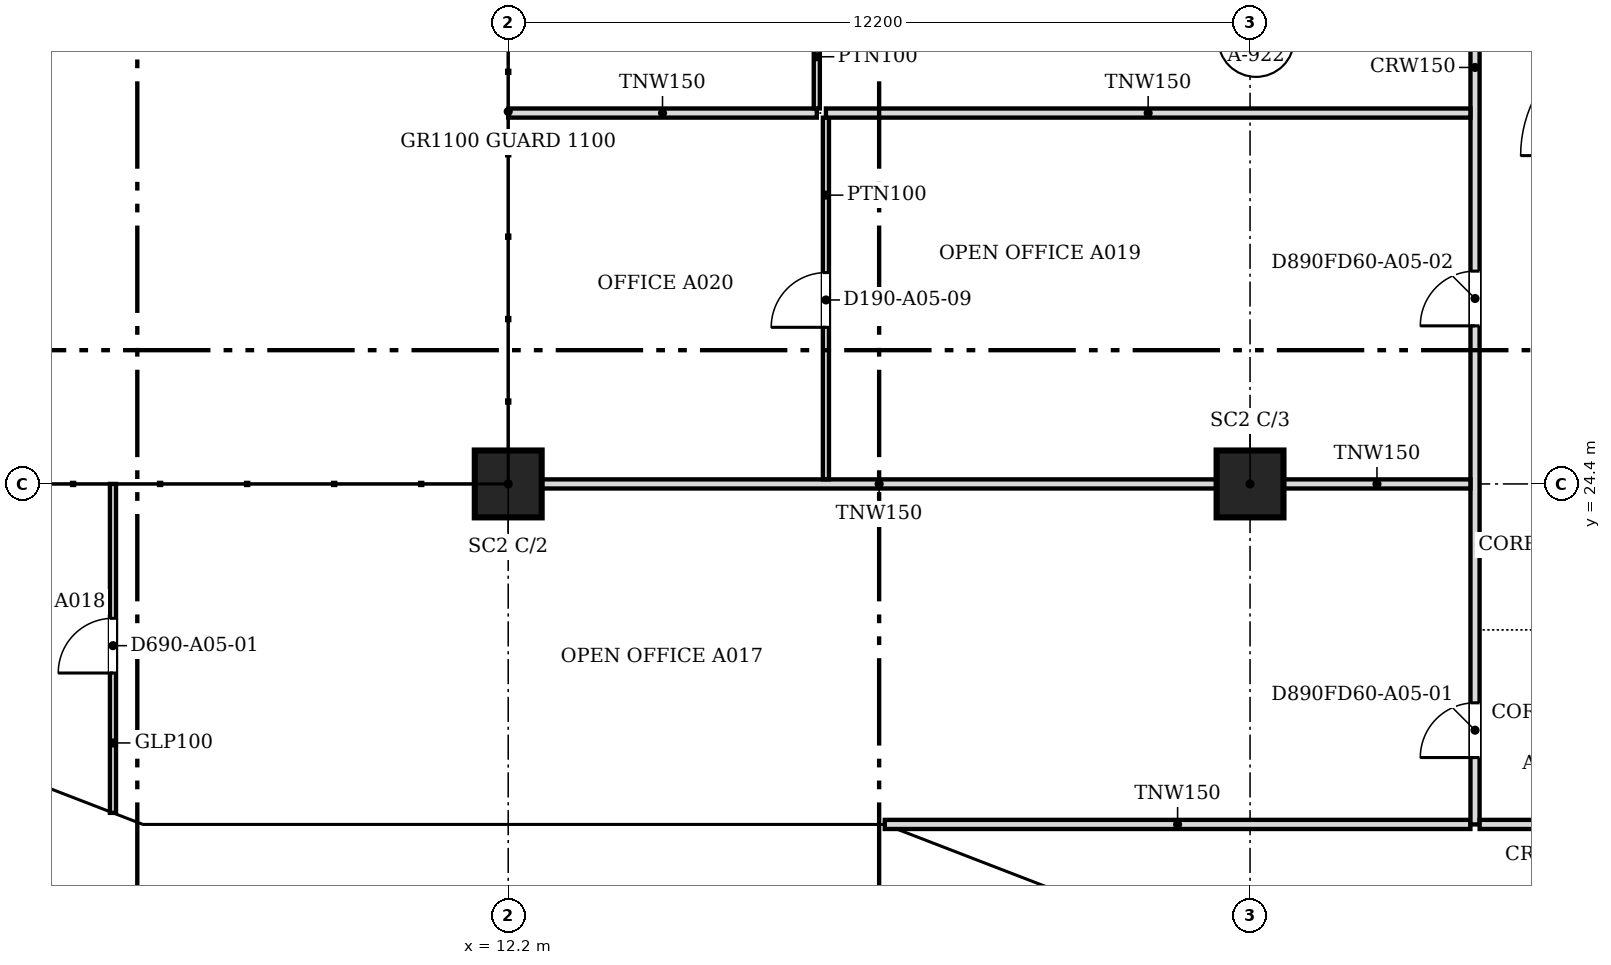
"""IFC4 building model, lengths in metres.
Left out: names, types, materials, properties, quantities, classifications, styles, units other than length and angle.
Written with IfcOpenShell. Run it as: python <this file> out.ifc"""

import sys

from ifc_helpers import new_model, si_unit, direction, frame, frame_2d, origin, origin_2d, place, context, subcontext, project, spatial, polyline, rectangle, outline, extrude, faceted_brep, source, transform, mapped, element, fill, save


model = new_model("IFC4")
c1 = context("Model", 3, precision=1e-05, world=origin(), true_north=direction((0.0, 1.0)))
c2 = subcontext(c1, "Body", "Model", "MODEL_VIEW")
j1 = project(units=[si_unit("LENGTHUNIT", "METRE"), si_unit("PLANEANGLEUNIT", "RADIAN")], contexts=[c1])
p1 = place(None, origin())
s1 = spatial("IfcSite", under=j1, at=p1, CompositionType="ELEMENT")
p2 = place(p1, origin())
s2 = spatial("IfcBuilding", under=s1, at=p2, CompositionType="ELEMENT")
p3 = place(p2, frame((0.0, 0.0, 56.2)))
s3 = spatial("IfcBuildingStorey", under=s2, at=p3, CompositionType="ELEMENT", Elevation=56.2)
for number, where, z_axis, x_axis in (
    (1, (12.2, 24.4, 0.0), (0.0, 0.0, 1.0), (1.0, 0.0, 0.0)),
    (2, (24.4, 24.4, 0.0), (0.0, 0.0, 1.0), (1.0, 0.0, 0.0)),
):
    element("IfcColumn", number, at=place(p3, frame(where, z_axis=z_axis, x_axis=x_axis)), inside=s3, PredefinedType="COLUMN", context=c2, shape_type="SweptSolid", body=[
        extrude(rectangle(XDim=1.1, YDim=1.1, at=origin_2d()), origin(), (0.0, 0.0, 1.0), 3.6),
    ])
m1 = source(origin(), c2, "Body", "Brep", [
    faceted_brep([(2.95, -0.25, 0.0), (2.997, -0.25, 0.059), (2.997, -0.25, 7.541), (2.95, -0.25, 7.6), (0.0, -0.25, 3.8), (0.053, 0.25, 3.868), (2.904, 0.25, 7.54), (2.904, 0.25, 0.06), (0.053, 0.25, 3.732), (2.95, 0.0, 0.0), (2.95, 0.0, 7.6), (0.0, 0.0, 3.8)], [[[0, 1, 2, 3, 4]], [[5, 6, 7, 8]], [[1, 0, 9]], [[10, 3, 2]], [[6, 5, 11, 4, 3, 10]], [[8, 7, 9, 0, 4, 11]], [[8, 11, 5]], [[1, 9, 7, 6, 10, 2]]]),
])
p4 = place(p3, frame((3.394, 19.612, -3.8), z_axis=(0.0, 0.0, 1.0), x_axis=(0.932990326376, -0.359901446078, 0.0)))
e3 = element("IfcWall", 3, at=p4, inside=s3, PredefinedType="SOLIDWALL", context=c2, shape_type="MappedRepresentation", body=[
    mapped(m1, transform((0.0, 0.0, 0.0), scale=1.0)),
])
m2 = source(origin(), c2, "Body", "SweptSolid", [
    extrude(outline(polyline([(2.75, 6.935), (0.316, 3.8), (2.75, 0.665), (2.75, 6.935)])), frame((0.0, 0.26, 0.0), z_axis=(0.0, -1.0, 0.0), x_axis=(1.0, 0.0, 0.0)), (0.0, 0.0, 1.0), 0.52),
])
p5 = place(p4, origin())
e4 = element("IfcOpeningElement", 4, at=p5, cuts=e3, PredefinedType="OPENING", context=c2, shape_type="MappedRepresentation", body=[
    mapped(m2, transform((0.0, 0.0, 0.0), scale=1.0)),
])
m3 = source(origin(), c2, "Body", "Brep", [
    faceted_brep([(0.047, -0.25, 0.0), (3.05, -0.25, 3.8), (0.047, -0.25, 7.6), (0.0, -0.25, 7.54), (0.0, -0.25, 0.06), (0.093, 0.25, 7.541), (3.05, 0.25, 3.8), (0.093, 0.25, 0.059), (0.047, 0.0, 0.0), (0.047, 0.0, 7.6)], [[[0, 1, 2, 3, 4]], [[5, 6, 7]], [[7, 6, 1, 0, 8]], [[6, 5, 9, 2, 1]], [[3, 2, 9]], [[8, 0, 4]], [[7, 8, 4, 3, 9, 5]]]),
])
p6 = place(p3, frame((6.1, 18.55, -3.8), z_axis=(0.0, 0.0, 1.0), x_axis=(1.0, 0.0, 0.0)))
e5 = element("IfcWall", 5, at=p6, inside=s3, PredefinedType="SOLIDWALL", context=c2, shape_type="MappedRepresentation", body=[
    mapped(m3, transform((0.0, 0.0, 0.0), scale=1.0)),
])
m4 = source(origin(), c2, "Body", "SweptSolid", [
    extrude(outline(polyline([(0.247, 0.656), (2.731, 3.8), (0.247, 6.944), (0.247, 0.656)])), frame((0.0, 0.26, 0.0), z_axis=(0.0, -1.0, 0.0), x_axis=(1.0, 0.0, 0.0)), (0.0, 0.0, 1.0), 0.52),
])
p7 = place(p6, origin())
e6 = element("IfcOpeningElement", 6, at=p7, cuts=e5, PredefinedType="OPENING", context=c2, shape_type="MappedRepresentation", body=[
    mapped(m4, transform((0.0, 0.0, 0.0), scale=1.0)),
])
m5 = source(origin(), c2, "Body", "SweptSolid", [
    extrude(outline(polyline([(3.05, 0.0), (6.1, 3.8), (3.05, 7.6), (0.0, 3.8), (3.05, 0.0)])), frame((0.0, 0.25, 0.0), z_axis=(0.0, -1.0, 0.0), x_axis=(1.0, 0.0, 0.0)), (0.0, 0.0, 1.0), 0.5),
])
p8 = place(p3, frame((9.15, 18.55, -3.8), z_axis=(0.0, 0.0, 1.0), x_axis=(1.0, 0.0, 0.0)))
e7 = element("IfcWall", 7, at=p8, inside=s3, PredefinedType="SOLIDWALL", context=c2, shape_type="MappedRepresentation", body=[
    mapped(m5, transform((0.0, 0.0, 0.0), scale=1.0)),
])
m6 = source(origin(), c2, "Body", "SweptSolid", [
    extrude(outline(polyline([(3.05, 0.399), (5.78, 3.8), (3.05, 7.201), (0.321, 3.8), (3.05, 0.399)])), frame((0.0, 0.26, 0.0), z_axis=(0.0, -1.0, 0.0), x_axis=(1.0, 0.0, 0.0)), (0.0, 0.0, 1.0), 0.52),
])
p9 = place(p8, origin())
e8 = element("IfcOpeningElement", 8, at=p9, cuts=e7, PredefinedType="OPENING", context=c2, shape_type="MappedRepresentation", body=[
    mapped(m6, transform((0.0, 0.0, 0.0), scale=1.0)),
])
m7 = source(origin(), c2, "Body", "Brep", [
    faceted_brep([(3.05, -0.25, 7.543), (0.0, -0.25, 3.8), (3.05, -0.25, 0.057), (0.0, 0.25, 3.8), (3.096, 0.25, 7.6), (3.143, 0.25, 7.544), (3.143, 0.25, 0.056), (3.096, 0.25, 0.0), (3.096, -0.0, 0.0), (3.096, -0.0, 7.6)], [[[0, 1, 2]], [[3, 4, 5, 6, 7]], [[7, 6, 8]], [[5, 4, 9]], [[4, 3, 1, 0, 9]], [[3, 7, 8, 2, 1]], [[2, 8, 6, 5, 9, 0]]]),
])
p10 = place(p3, frame((15.25, 18.55, -3.8), z_axis=(0.0, 0.0, 1.0), x_axis=(1.0, 0.0, 0.0)))
e9 = element("IfcWall", 9, at=p10, inside=s3, PredefinedType="SOLIDWALL", context=c2, shape_type="MappedRepresentation", body=[
    mapped(m7, transform((0.0, 0.0, 0.0), scale=1.0)),
])
m8 = source(origin(), c2, "Body", "SweptSolid", [
    extrude(outline(polyline([(2.896, 6.959), (0.323, 3.8), (2.896, 0.641), (2.896, 6.959)])), frame((0.0, 0.26, 0.0), z_axis=(0.0, -1.0, 0.0), x_axis=(1.0, 0.0, 0.0)), (0.0, 0.0, 1.0), 0.52),
])
p11 = place(p10, origin())
e10 = element("IfcOpeningElement", 10, at=p11, cuts=e9, PredefinedType="OPENING", context=c2, shape_type="MappedRepresentation", body=[
    mapped(m8, transform((0.0, 0.0, 0.0), scale=1.0)),
])
m9 = source(origin(), c2, "Body", "Brep", [
    faceted_brep([(0.093, -0.25, 0.056), (3.143, -0.25, 3.736), (3.143, -0.25, 3.864), (0.093, -0.25, 7.544), (0.0, 0.25, 7.543), (0.047, 0.25, 7.6), (3.196, 0.25, 3.8), (0.047, 0.25, 0.0), (0.0, 0.25, 0.057), (3.196, -0.0, 3.8), (0.047, 0.0, 0.0), (0.047, 0.0, 7.6)], [[[0, 1, 2, 3]], [[4, 5, 6, 7, 8]], [[7, 6, 9, 1, 0, 10]], [[6, 5, 11, 3, 2, 9]], [[5, 4, 11]], [[8, 7, 10]], [[8, 10, 0, 3, 11, 4]], [[1, 9, 2]]]),
])
p12 = place(p3, frame((18.303, 18.567, -3.8), z_axis=(0.0, 0.0, 1.0), x_axis=(0.932978940178, -0.359930961693, 0.0)))
e11 = element("IfcWall", 11, at=p12, inside=s3, PredefinedType="SOLIDWALL", context=c2, shape_type="MappedRepresentation", body=[
    mapped(m9, transform((0.0, 0.0, 0.0), scale=1.0)),
])
m10 = source(origin(), c2, "Body", "SweptSolid", [
    extrude(outline(polyline([(0.247, 0.633), (2.871, 3.8), (0.247, 6.967), (0.247, 0.633)])), frame((0.0, 0.26, 0.0), z_axis=(0.0, -1.0, 0.0), x_axis=(1.0, 0.0, 0.0)), (0.0, 0.0, 1.0), 0.52),
])
p13 = place(p12, origin())
e12 = element("IfcOpeningElement", 12, at=p13, cuts=e11, PredefinedType="OPENING", context=c2, shape_type="MappedRepresentation", body=[
    mapped(m10, transform((0.0, 0.0, 0.0), scale=1.0)),
])
p14 = place(p2, frame((0.0, 0.0, 60.0)))
s4 = spatial("IfcBuildingStorey", under=s2, at=p14, CompositionType="ELEMENT", Elevation=60.0)
m11 = source(origin(), c2, "Body", "Brep", [
    faceted_brep([(0.053, -0.25, 0.0), (3.003, -0.25, 3.8), (0.053, -0.25, 7.6), (0.0, -0.25, 7.532), (0.0, -0.25, 0.068), (0.106, 0.25, 7.532), (2.957, 0.25, 3.86), (2.957, 0.25, 3.74), (0.106, 0.25, 0.068), (3.003, 0.0, 3.8), (0.053, 0.0, 0.0), (0.053, 0.0, 7.6)], [[[0, 1, 2, 3, 4]], [[5, 6, 7, 8]], [[8, 7, 9, 1, 0, 10]], [[6, 5, 11, 2, 1, 9]], [[3, 2, 11]], [[10, 0, 4]], [[8, 10, 4, 3, 11, 5]], [[9, 7, 6]]]),
])
p15 = place(p14, frame((3.344, 19.631, -3.8), z_axis=(0.0, 0.0, 1.0), x_axis=(0.933007896601, -0.359855894603, 0.0)))
e13 = element("IfcWall", 13, at=p15, inside=s4, PredefinedType="SOLIDWALL", context=c2, shape_type="MappedRepresentation", body=[
    mapped(m11, transform((0.0, 0.0, 0.0), scale=1.0)),
])
m12 = source(origin(), c2, "Body", "SweptSolid", [
    extrude(outline(polyline([(0.253, 0.665), (2.687, 3.8), (0.253, 6.935), (0.253, 0.665)])), frame((0.0, 0.26, 0.0), z_axis=(0.0, -1.0, 0.0), x_axis=(1.0, 0.0, 0.0)), (0.0, 0.0, 1.0), 0.52),
])
p16 = place(p15, origin())
e14 = element("IfcOpeningElement", 14, at=p16, cuts=e13, PredefinedType="OPENING", context=c2, shape_type="MappedRepresentation", body=[
    mapped(m12, transform((0.0, 0.0, 0.0), scale=1.0)),
])
m13 = source(origin(), c2, "Body", "Brep", [
    faceted_brep([(3.003, -0.25, 0.0), (6.053, -0.25, 3.8), (3.003, -0.25, 7.6), (0.0, -0.25, 3.8), (0.047, 0.25, 3.859), (3.003, 0.25, 7.6), (6.053, 0.25, 3.8), (3.003, 0.25, 0.0), (0.047, 0.25, 3.741), (0.0, 0.0, 3.8)], [[[0, 1, 2, 3]], [[4, 5, 6, 7, 8]], [[7, 6, 1, 0]], [[6, 5, 2, 1]], [[5, 4, 9, 3, 2]], [[8, 7, 0, 3, 9]], [[8, 9, 4]]]),
])
p17 = place(p14, frame((6.146, 18.55, -3.8), z_axis=(0.0, 0.0, 1.0), x_axis=(1.0, 0.0, 0.0)))
e15 = element("IfcWall", 15, at=p17, inside=s4, PredefinedType="SOLIDWALL", context=c2, shape_type="MappedRepresentation", body=[
    mapped(m13, transform((0.0, 0.0, 0.0), scale=1.0)),
])
m14 = source(origin(), c2, "Body", "SweptSolid", [
    extrude(outline(polyline([(3.005, 0.401), (5.733, 3.8), (3.005, 7.199), (0.319, 3.8), (3.005, 0.401)])), frame((0.0, 0.26, 0.0), z_axis=(0.0, -1.0, 0.0), x_axis=(1.0, 0.0, 0.0)), (0.0, 0.0, 1.0), 0.52),
])
p18 = place(p17, origin())
e16 = element("IfcOpeningElement", 16, at=p18, cuts=e15, PredefinedType="OPENING", context=c2, shape_type="MappedRepresentation", body=[
    mapped(m14, transform((0.0, 0.0, 0.0), scale=1.0)),
])
m15 = source(origin(), c2, "Body", "Brep", [
    faceted_brep([(3.05, -0.25, 0.0), (6.1, -0.25, 3.743), (6.1, -0.25, 3.857), (3.05, -0.25, 7.6), (0.0, -0.25, 3.8), (0.0, 0.25, 3.8), (3.05, 0.25, 7.6), (6.146, 0.25, 3.8), (3.05, 0.25, 0.0), (6.146, -0.0, 3.8)], [[[0, 1, 2, 3, 4]], [[5, 6, 7, 8]], [[8, 7, 9, 1, 0]], [[7, 6, 3, 2, 9]], [[6, 5, 4, 3]], [[5, 8, 0, 4]], [[1, 9, 2]]]),
])
p19 = place(p14, frame((12.2, 18.55, -3.8), z_axis=(0.0, 0.0, 1.0), x_axis=(1.0, 0.0, 0.0)))
e17 = element("IfcWall", 17, at=p19, inside=s4, PredefinedType="SOLIDWALL", context=c2, shape_type="MappedRepresentation", body=[
    mapped(m15, transform((0.0, 0.0, 0.0), scale=1.0)),
])
m16 = source(origin(), c2, "Body", "SweptSolid", [
    extrude(outline(polyline([(3.052, 0.398), (5.824, 3.8), (3.052, 7.202), (0.321, 3.8), (3.052, 0.398)])), frame((0.0, 0.26, 0.0), z_axis=(0.0, -1.0, 0.0), x_axis=(1.0, 0.0, 0.0)), (0.0, 0.0, 1.0), 0.52),
])
p20 = place(p19, origin())
e18 = element("IfcOpeningElement", 18, at=p20, cuts=e17, PredefinedType="OPENING", context=c2, shape_type="MappedRepresentation", body=[
    mapped(m16, transform((0.0, 0.0, 0.0), scale=1.0)),
])
m17 = source(origin(), c2, "Body", "Brep", [
    faceted_brep([(3.096, -0.25, 7.536), (0.047, -0.25, 3.856), (0.047, -0.25, 3.744), (3.096, -0.25, 0.064), (0.0, 0.25, 3.8), (3.149, 0.25, 7.6), (3.202, 0.25, 7.536), (3.202, 0.25, 0.064), (3.149, 0.25, 0.0), (3.149, -0.0, 0.0), (3.149, -0.0, 7.6), (0.0, 0.0, 3.8)], [[[0, 1, 2, 3]], [[4, 5, 6, 7, 8]], [[8, 7, 9]], [[6, 5, 10]], [[5, 4, 11, 1, 0, 10]], [[4, 8, 9, 3, 2, 11]], [[11, 2, 1]], [[3, 9, 7, 6, 10, 0]]]),
])
p21 = place(p14, frame((18.346, 18.55, -3.8), z_axis=(0.0, 0.0, 1.0), x_axis=(0.932985567668, -0.359913782069, 0.0)))
e19 = element("IfcWall", 19, at=p21, inside=s4, PredefinedType="SOLIDWALL", context=c2, shape_type="MappedRepresentation", body=[
    mapped(m17, transform((0.0, 0.0, 0.0), scale=1.0)),
])
m18 = source(origin(), c2, "Body", "SweptSolid", [
    extrude(outline(polyline([(2.949, 6.967), (0.325, 3.8), (2.949, 0.633), (2.949, 6.967)])), frame((0.0, 0.26, 0.0), z_axis=(0.0, -1.0, 0.0), x_axis=(1.0, 0.0, 0.0)), (0.0, 0.0, 1.0), 0.52),
])
p22 = place(p21, origin())
e20 = element("IfcOpeningElement", 20, at=p22, cuts=e19, PredefinedType="OPENING", context=c2, shape_type="MappedRepresentation", body=[
    mapped(m18, transform((0.0, 0.0, 0.0), scale=1.0)),
])
p23 = place(p3, frame((18.393, 18.8, 0.0), z_axis=(0.0, 0.0, 1.0), x_axis=(1.0, 0.0, 0.0)))
e21 = element("IfcWall", 21, at=p23, inside=s3, PredefinedType="PARTITIONING", context=c2, shape_type="SweptSolid", body=[
    extrude(rectangle(XDim=9.631, YDim=0.15, at=frame_2d((4.815, 0.0))), origin(), (0.0, 0.0, 1.0), 3.067),
])
p24 = place(p3, frame((28.1, 18.8, 0.0), z_axis=(0.0, 0.0, 1.0), x_axis=(0.0, 1.0, 0.0)))
e22 = element("IfcWall", 22, at=p24, inside=s3, PredefinedType="PARTITIONING", context=c2, shape_type="SweptSolid", body=[
    extrude(rectangle(XDim=26.5, YDim=0.15, at=frame_2d((13.25, 0.0))), origin(), (0.0, 0.0, 1.0), 3.067),
])
m19 = source(origin(), c2, "Body", "SweptSolid", [
    extrude(rectangle(XDim=0.9, YDim=2.1, at=frame_2d((0.45, 1.05))), frame((0.0, 0.085, 0.0), z_axis=(0.0, -1.0, 0.0), x_axis=(1.0, 0.0, 0.0)), (0.0, 0.0, 1.0), 0.17),
])
p25 = place(p24, frame((1.1, 0.0, 0.0)))
e23 = element("IfcOpeningElement", 23, at=p25, cuts=e22, PredefinedType="OPENING", context=c2, shape_type="MappedRepresentation", body=[
    mapped(m19, transform((0.0, 0.0, 0.0), scale=1.0)),
])
m20 = source(origin(), c2, "Body", "SweptSolid", [
    extrude(rectangle(XDim=1.0, YDim=2.1, at=frame_2d((0.5, 1.05))), frame((0.0, 0.085, 0.0), z_axis=(0.0, -1.0, 0.0), x_axis=(1.0, 0.0, 0.0)), (0.0, 0.0, 1.0), 0.17),
])
p26 = place(p24, frame((23.151, 0.0, 0.0)))
e24 = element("IfcOpeningElement", 24, at=p26, cuts=e22, PredefinedType="OPENING", context=c2, shape_type="MappedRepresentation", body=[
    mapped(m20, transform((0.0, 0.0, 0.0), scale=1.0)),
])
p27 = place(p24, frame((8.2, 0.0, 0.0)))
e25 = element("IfcOpeningElement", 25, at=p27, cuts=e22, PredefinedType="OPENING", context=c2, shape_type="MappedRepresentation", body=[
    mapped(m19, transform((0.0, 0.0, 0.0), scale=1.0)),
])
p28 = place(p24, frame((15.8, 0.0, 0.0)))
e26 = element("IfcOpeningElement", 26, at=p28, cuts=e22, PredefinedType="OPENING", context=c2, shape_type="MappedRepresentation", body=[
    mapped(m19, transform((0.0, 0.0, 0.0), scale=1.0)),
])
p29 = place(p3, frame((28.176, 18.8, 0.0), z_axis=(0.0, 0.0, 1.0), x_axis=(1.0, 0.0, 0.0)))
e27 = element("IfcWall", 27, at=p29, inside=s3, PredefinedType="PARTITIONING", context=c2, shape_type="SweptSolid", body=[
    extrude(rectangle(XDim=2.248, YDim=0.15, at=frame_2d((1.124, 0.0))), origin(), (0.0, 0.0, 1.0), 3.067),
])
p30 = place(p3, frame((5.7, 18.99, 0.0), z_axis=(0.0, 0.0, 1.0), x_axis=(0.0, 1.0, 0.0)))
e28 = element("IfcWall", 28, at=p30, inside=s3, PredefinedType="PARTITIONING", context=c2, shape_type="SweptSolid", body=[
    extrude(rectangle(XDim=5.41, YDim=0.1, at=frame_2d((2.705, 0.0))), origin(), (0.0, 0.0, 1.0), 3.067),
])
m21 = source(origin(), c2, "Body", "SweptSolid", [
    extrude(rectangle(XDim=0.9, YDim=2.1, at=frame_2d((0.45, 1.05))), frame((0.0, 0.06, 0.0), z_axis=(0.0, -1.0, 0.0), x_axis=(1.0, 0.0, 0.0)), (0.0, 0.0, 1.0), 0.12),
])
p31 = place(p30, frame((2.3, 0.0, 0.0)))
e29 = element("IfcOpeningElement", 29, at=p31, cuts=e28, PredefinedType="OPENING", context=c2, shape_type="MappedRepresentation", body=[
    mapped(m21, transform((0.0, 0.0, 0.0), scale=1.0)),
])
p32 = place(p3, frame((12.751, 24.4, 0.0), z_axis=(0.0, 0.0, 1.0), x_axis=(1.0, 0.0, 0.0)))
e30 = element("IfcWall", 30, at=p32, inside=s3, PredefinedType="PARTITIONING", context=c2, shape_type="SweptSolid", body=[
    extrude(rectangle(XDim=11.098, YDim=0.15, at=frame_2d((5.549, 0.0))), origin(), (0.0, 0.0, 1.0), 3.067),
])
p33 = place(p3, frame((24.951, 24.4, 0.0), z_axis=(0.0, 0.0, 1.0), x_axis=(1.0, 0.0, 0.0)))
e31 = element("IfcWall", 31, at=p33, inside=s3, PredefinedType="PARTITIONING", context=c2, shape_type="SweptSolid", body=[
    extrude(rectangle(XDim=3.073, YDim=0.15, at=frame_2d((1.537, 0.0))), origin(), (0.0, 0.0, 1.0), 3.067),
])
p34 = place(p3, frame((17.425, 24.476, 0.0), z_axis=(0.0, 0.0, 1.0), x_axis=(0.0, 1.0, 0.0)))
e32 = element("IfcWall", 32, at=p34, inside=s3, PredefinedType="PARTITIONING", context=c2, shape_type="SweptSolid", body=[
    extrude(rectangle(XDim=5.948, YDim=0.1, at=frame_2d((2.974, 0.0))), origin(), (0.0, 0.0, 1.0), 3.067),
])
p35 = place(p34, frame((2.5, 0.0, 0.0)))
e33 = element("IfcOpeningElement", 33, at=p35, cuts=e32, PredefinedType="OPENING", context=c2, shape_type="MappedRepresentation", body=[
    mapped(m21, transform((0.0, 0.0, 0.0), scale=1.0)),
])
p36 = place(p3, frame((12.2, 30.5, 0.0), z_axis=(0.0, 0.0, 1.0), x_axis=(1.0, 0.0, 0.0)))
e34 = element("IfcWall", 34, at=p36, inside=s3, PredefinedType="PARTITIONING", context=c2, shape_type="SweptSolid", body=[
    extrude(rectangle(XDim=5.075, YDim=0.15, at=frame_2d((2.538, 0.0))), origin(), (0.0, 0.0, 1.0), 3.067),
])
p37 = place(p3, frame((17.425, 30.5, 0.0), z_axis=(0.0, 0.0, 1.0), x_axis=(1.0, 0.0, 0.0)))
e35 = element("IfcWall", 35, at=p37, inside=s3, PredefinedType="PARTITIONING", context=c2, shape_type="SweptSolid", body=[
    extrude(rectangle(XDim=10.599, YDim=0.15, at=frame_2d((5.299, 0.0))), origin(), (0.0, 0.0, 1.0), 3.067),
])
p38 = place(p3, frame((17.275, 30.576, 0.0), z_axis=(0.0, 0.0, 1.0), x_axis=(0.0, 1.0, 0.0)))
e36 = element("IfcWall", 36, at=p38, inside=s3, PredefinedType="PARTITIONING", context=c2, shape_type="SweptSolid", body=[
    extrude(rectangle(XDim=4.293, YDim=0.1, at=frame_2d((2.147, 0.0))), origin(), (0.0, 0.0, 1.0), 3.067),
])
p39 = place(p38, frame((1.7, 0.0, 0.0)))
e37 = element("IfcOpeningElement", 37, at=p39, cuts=e36, PredefinedType="OPENING", context=c2, shape_type="MappedRepresentation", body=[
    mapped(m21, transform((0.0, 0.0, 0.0), scale=1.0)),
])
m22 = source(origin(), c2, "Body", "SweptSolid", [
    extrude(rectangle(XDim=0.9, YDim=2.1, at=frame_2d((0.45, 1.05))), frame((0.0, 0.025, 0.0), z_axis=(0.0, -1.0, 0.0), x_axis=(1.0, 0.0, 0.0)), (0.0, 0.0, 1.0), 0.05),
])
p40 = place(p25, origin())
e38 = element("IfcDoor", 38, at=p40, inside=s3, OperationType="SINGLE_SWING_LEFT", PredefinedType="DOOR", context=c2, shape_type="MappedRepresentation", body=[
    mapped(m22, transform((0.0, 0.0, 0.0), scale=1.0)),
])
fill(e23, e38)
p41 = place(p31, origin())
e39 = element("IfcDoor", 39, at=p41, inside=s3, OperationType="SINGLE_SWING_LEFT", PredefinedType="DOOR", context=c2, shape_type="MappedRepresentation", body=[
    mapped(m22, transform((0.0, 0.0, 0.0), scale=1.0)),
])
fill(e29, e39)
p42 = place(p35, origin())
e40 = element("IfcDoor", 40, at=p42, inside=s3, OperationType="SINGLE_SWING_LEFT", PredefinedType="DOOR", context=c2, shape_type="MappedRepresentation", body=[
    mapped(m22, transform((0.0, 0.0, 0.0), scale=1.0)),
])
fill(e33, e40)
p43 = place(p27, origin())
e41 = element("IfcDoor", 41, at=p43, inside=s3, OperationType="SINGLE_SWING_LEFT", PredefinedType="DOOR", context=c2, shape_type="MappedRepresentation", body=[
    mapped(m22, transform((0.0, 0.0, 0.0), scale=1.0)),
])
fill(e25, e41)
save(model, sys.argv[1])
